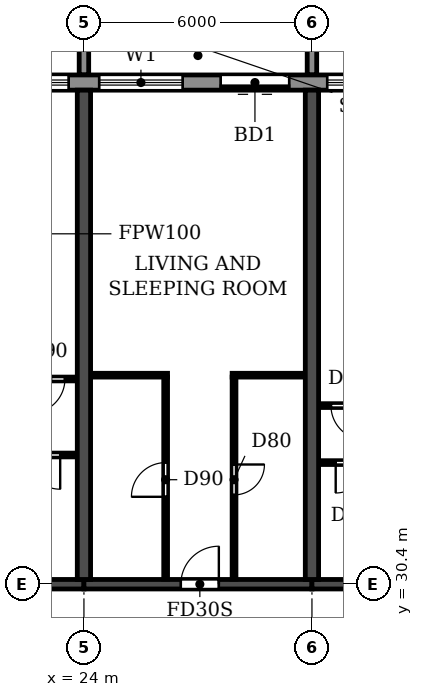
"""IFC4 building model, lengths in metres.
Left out: names, types, materials, properties, quantities, classifications, styles, units other than length and angle.
Written with IfcOpenShell. Run it as: python <this file> out.ifc"""

import sys

from ifc_helpers import new_model, si_unit, direction, frame, frame_2d, origin, place, context, subcontext, project, spatial, polyline, rectangle, outline, extrude, source, transform, mapped, element, fill, save


model = new_model("IFC4")
c1 = context("Model", 3, precision=1e-05, world=origin(), true_north=direction((0.0, 1.0)))
c2 = subcontext(c1, "Body", "Model", "MODEL_VIEW")
j1 = project(units=[si_unit("LENGTHUNIT", "METRE"), si_unit("PLANEANGLEUNIT", "RADIAN")], contexts=[c1])
p1 = place(None, origin())
s1 = spatial("IfcSite", under=j1, at=p1, CompositionType="ELEMENT")
p2 = place(p1, origin())
s2 = spatial("IfcBuilding", under=s1, at=p2, CompositionType="ELEMENT")
p3 = place(p2, frame((0.0, 0.0, 72.9)))
s3 = spatial("IfcBuildingStorey", under=s2, at=p3, CompositionType="ELEMENT", Elevation=72.9)
for number, where, z_axis, x_axis in (
    (1, (24.0, 30.525, 0.0), (0.0, 0.0, 1.0), (0.0, 1.0, 0.0)),
    (2, (30.0, 30.525, 0.0), (0.0, 0.0, 1.0), (0.0, 1.0, 0.0)),
):
    element("IfcWall", number, at=place(p3, frame(where, z_axis=z_axis, x_axis=x_axis)), inside=s3, PredefinedType="SHEAR", context=c2, shape_type="SweptSolid", body=[
        extrude(rectangle(XDim=12.875, YDim=0.35, at=frame_2d((6.438, 0.0))), origin(), (0.0, 0.0, 1.0), 3.06),
    ])
p4 = place(p3, frame((18.0, 30.4, 0.0), z_axis=(0.0, 0.0, 1.0), x_axis=(1.0, 0.0, 0.0)))
e3 = element("IfcWall", 3, at=p4, inside=s3, PredefinedType="SHEAR", context=c2, shape_type="SweptSolid", body=[
    extrude(rectangle(XDim=6.0, YDim=0.25, at=frame_2d((3.0, 0.0))), origin(), (0.0, 0.0, 1.0), 2.46),
])
p5 = place(p4, frame((2.45, 0.0, 0.0)))
e4 = element("IfcOpeningElement", 4, at=p5, cuts=e3, PredefinedType="OPENING", context=c2, shape_type="SweptSolid", body=[
    extrude(rectangle(XDim=1.0, YDim=2.1, at=frame_2d((0.5, 1.05))), frame((0.0, 0.135, 0.0), z_axis=(0.0, -1.0, 0.0), x_axis=(1.0, 0.0, 0.0)), (0.0, 0.0, 1.0), 0.27),
])
p6 = place(p3, frame((24.0, 30.4, 0.0), z_axis=(0.0, 0.0, 1.0), x_axis=(1.0, 0.0, 0.0)))
e5 = element("IfcWall", 5, at=p6, inside=s3, PredefinedType="SHEAR", context=c2, shape_type="SweptSolid", body=[
    extrude(rectangle(XDim=6.0, YDim=0.25, at=frame_2d((3.0, 0.0))), origin(), (0.0, 0.0, 1.0), 2.46),
])
p7 = place(p6, frame((2.55, 0.0, 0.0)))
e6 = element("IfcOpeningElement", 6, at=p7, cuts=e5, PredefinedType="OPENING", context=c2, shape_type="SweptSolid", body=[
    extrude(rectangle(XDim=1.0, YDim=2.1, at=frame_2d((0.5, 1.05))), frame((0.0, 0.135, 0.0), z_axis=(0.0, -1.0, 0.0), x_axis=(1.0, 0.0, 0.0)), (0.0, 0.0, 1.0), 0.27),
])
p8 = place(p3, frame((30.0, 30.4, 0.0), z_axis=(0.0, 0.0, 1.0), x_axis=(1.0, 0.0, 0.0)))
e7 = element("IfcWall", 7, at=p8, inside=s3, PredefinedType="SHEAR", context=c2, shape_type="SweptSolid", body=[
    extrude(rectangle(XDim=6.0, YDim=0.25, at=frame_2d((3.0, 0.0))), origin(), (0.0, 0.0, 1.0), 2.46),
])
p9 = place(p8, frame((2.45, 0.0, 0.0)))
e8 = element("IfcOpeningElement", 8, at=p9, cuts=e7, PredefinedType="OPENING", context=c2, shape_type="SweptSolid", body=[
    extrude(rectangle(XDim=1.0, YDim=2.1, at=frame_2d((0.5, 1.05))), frame((0.0, 0.135, 0.0), z_axis=(0.0, -1.0, 0.0), x_axis=(1.0, 0.0, 0.0)), (0.0, 0.0, 1.0), 0.27),
])
p10 = place(p3, frame((91.317, 43.6, 0.0), z_axis=(0.0, 0.0, 1.0), x_axis=(-1.0, 0.0, 0.0)))
e9 = element("IfcWall", 9, at=p10, inside=s3, PredefinedType="STANDARD", context=c2, shape_type="SweptSolid", body=[
    extrude(rectangle(XDim=80.634, YDim=0.4, at=frame_2d((40.317, 0.0))), origin(), (0.0, 0.0, 1.0), 3.06),
])
p11 = place(p10, frame((76.717, 0.0, 0.9)))
e10 = element("IfcOpeningElement", 10, at=p11, cuts=e9, PredefinedType="OPENING", context=c2, shape_type="SweptSolid", body=[
    extrude(rectangle(XDim=2.2, YDim=1.5, at=frame_2d((1.1, 0.75))), frame((0.0, 0.21, 0.0), z_axis=(0.0, -1.0, 0.0), x_axis=(1.0, 0.0, 0.0)), (0.0, 0.0, 1.0), 0.42),
])
p12 = place(p10, frame((73.917, 0.0, 0.0)))
e11 = element("IfcOpeningElement", 11, at=p12, cuts=e9, PredefinedType="OPENING", context=c2, shape_type="SweptSolid", body=[
    extrude(rectangle(XDim=1.8, YDim=2.4, at=frame_2d((0.9, 1.2))), frame((0.0, 0.21, 0.0), z_axis=(0.0, -1.0, 0.0), x_axis=(1.0, 0.0, 0.0)), (0.0, 0.0, 1.0), 0.42),
])
p13 = place(p10, frame((70.917, 0.0, 0.0)))
e12 = element("IfcOpeningElement", 12, at=p13, cuts=e9, PredefinedType="OPENING", context=c2, shape_type="SweptSolid", body=[
    extrude(rectangle(XDim=1.8, YDim=2.4, at=frame_2d((0.9, 1.2))), frame((0.0, 0.21, 0.0), z_axis=(0.0, -1.0, 0.0), x_axis=(1.0, 0.0, 0.0)), (0.0, 0.0, 1.0), 0.42),
])
p14 = place(p10, frame((67.717, 0.0, 0.9)))
e13 = element("IfcOpeningElement", 13, at=p14, cuts=e9, PredefinedType="OPENING", context=c2, shape_type="SweptSolid", body=[
    extrude(rectangle(XDim=2.2, YDim=1.5, at=frame_2d((1.1, 0.75))), frame((0.0, 0.21, 0.0), z_axis=(0.0, -1.0, 0.0), x_axis=(1.0, 0.0, 0.0)), (0.0, 0.0, 1.0), 0.42),
])
p15 = place(p10, frame((64.717, 0.0, 0.9)))
e14 = element("IfcOpeningElement", 14, at=p15, cuts=e9, PredefinedType="OPENING", context=c2, shape_type="SweptSolid", body=[
    extrude(rectangle(XDim=2.2, YDim=1.5, at=frame_2d((1.1, 0.75))), frame((0.0, 0.21, 0.0), z_axis=(0.0, -1.0, 0.0), x_axis=(1.0, 0.0, 0.0)), (0.0, 0.0, 1.0), 0.42),
])
p16 = place(p10, frame((61.917, 0.0, 0.0)))
e15 = element("IfcOpeningElement", 15, at=p16, cuts=e9, PredefinedType="OPENING", context=c2, shape_type="SweptSolid", body=[
    extrude(rectangle(XDim=1.8, YDim=2.4, at=frame_2d((0.9, 1.2))), frame((0.0, 0.21, 0.0), z_axis=(0.0, -1.0, 0.0), x_axis=(1.0, 0.0, 0.0)), (0.0, 0.0, 1.0), 0.42),
])
p17 = place(p10, frame((58.717, 0.0, 0.9)))
e16 = element("IfcOpeningElement", 16, at=p17, cuts=e9, PredefinedType="OPENING", context=c2, shape_type="SweptSolid", body=[
    extrude(rectangle(XDim=2.2, YDim=1.5, at=frame_2d((1.1, 0.75))), frame((0.0, 0.21, 0.0), z_axis=(0.0, -1.0, 0.0), x_axis=(1.0, 0.0, 0.0)), (0.0, 0.0, 1.0), 0.42),
])
p18 = place(p10, frame((55.917, 0.0, 0.0)))
e17 = element("IfcOpeningElement", 17, at=p18, cuts=e9, PredefinedType="OPENING", context=c2, shape_type="SweptSolid", body=[
    extrude(rectangle(XDim=1.8, YDim=2.4, at=frame_2d((0.9, 1.2))), frame((0.0, 0.21, 0.0), z_axis=(0.0, -1.0, 0.0), x_axis=(1.0, 0.0, 0.0)), (0.0, 0.0, 1.0), 0.42),
])
p19 = place(p10, frame((52.717, 0.0, 0.9)))
e18 = element("IfcOpeningElement", 18, at=p19, cuts=e9, PredefinedType="OPENING", context=c2, shape_type="SweptSolid", body=[
    extrude(rectangle(XDim=2.2, YDim=1.5, at=frame_2d((1.1, 0.75))), frame((0.0, 0.21, 0.0), z_axis=(0.0, -1.0, 0.0), x_axis=(1.0, 0.0, 0.0)), (0.0, 0.0, 1.0), 0.42),
])
p20 = place(p10, frame((49.717, 0.0, 0.9)))
e19 = element("IfcOpeningElement", 19, at=p20, cuts=e9, PredefinedType="OPENING", context=c2, shape_type="SweptSolid", body=[
    extrude(rectangle(XDim=2.2, YDim=1.5, at=frame_2d((1.1, 0.75))), frame((0.0, 0.21, 0.0), z_axis=(0.0, -1.0, 0.0), x_axis=(1.0, 0.0, 0.0)), (0.0, 0.0, 1.0), 0.42),
])
p21 = place(p10, frame((46.917, 0.0, 0.0)))
e20 = element("IfcOpeningElement", 20, at=p21, cuts=e9, PredefinedType="OPENING", context=c2, shape_type="SweptSolid", body=[
    extrude(rectangle(XDim=1.8, YDim=2.4, at=frame_2d((0.9, 1.2))), frame((0.0, 0.21, 0.0), z_axis=(0.0, -1.0, 0.0), x_axis=(1.0, 0.0, 0.0)), (0.0, 0.0, 1.0), 0.42),
])
p22 = place(p10, frame((43.717, 0.0, 0.9)))
e21 = element("IfcOpeningElement", 21, at=p22, cuts=e9, PredefinedType="OPENING", context=c2, shape_type="SweptSolid", body=[
    extrude(rectangle(XDim=2.2, YDim=1.5, at=frame_2d((1.1, 0.75))), frame((0.0, 0.21, 0.0), z_axis=(0.0, -1.0, 0.0), x_axis=(1.0, 0.0, 0.0)), (0.0, 0.0, 1.0), 0.42),
])
p23 = place(p10, frame((40.717, 0.0, 0.9)))
e22 = element("IfcOpeningElement", 22, at=p23, cuts=e9, PredefinedType="OPENING", context=c2, shape_type="SweptSolid", body=[
    extrude(rectangle(XDim=2.2, YDim=1.5, at=frame_2d((1.1, 0.75))), frame((0.0, 0.21, 0.0), z_axis=(0.0, -1.0, 0.0), x_axis=(1.0, 0.0, 0.0)), (0.0, 0.0, 1.0), 0.42),
])
p24 = place(p10, frame((37.917, 0.0, 0.0)))
e23 = element("IfcOpeningElement", 23, at=p24, cuts=e9, PredefinedType="OPENING", context=c2, shape_type="SweptSolid", body=[
    extrude(rectangle(XDim=1.8, YDim=2.4, at=frame_2d((0.9, 1.2))), frame((0.0, 0.21, 0.0), z_axis=(0.0, -1.0, 0.0), x_axis=(1.0, 0.0, 0.0)), (0.0, 0.0, 1.0), 0.42),
])
p25 = place(p10, frame((34.717, 0.0, 0.9)))
e24 = element("IfcOpeningElement", 24, at=p25, cuts=e9, PredefinedType="OPENING", context=c2, shape_type="SweptSolid", body=[
    extrude(rectangle(XDim=2.2, YDim=1.5, at=frame_2d((1.1, 0.75))), frame((0.0, 0.21, 0.0), z_axis=(0.0, -1.0, 0.0), x_axis=(1.0, 0.0, 0.0)), (0.0, 0.0, 1.0), 0.42),
])
p26 = place(p10, frame((31.917, 0.0, 0.0)))
e25 = element("IfcOpeningElement", 25, at=p26, cuts=e9, PredefinedType="OPENING", context=c2, shape_type="SweptSolid", body=[
    extrude(rectangle(XDim=1.8, YDim=2.4, at=frame_2d((0.9, 1.2))), frame((0.0, 0.21, 0.0), z_axis=(0.0, -1.0, 0.0), x_axis=(1.0, 0.0, 0.0)), (0.0, 0.0, 1.0), 0.42),
])
p27 = place(p10, frame((28.717, 0.0, 0.9)))
e26 = element("IfcOpeningElement", 26, at=p27, cuts=e9, PredefinedType="OPENING", context=c2, shape_type="SweptSolid", body=[
    extrude(rectangle(XDim=2.2, YDim=1.5, at=frame_2d((1.1, 0.75))), frame((0.0, 0.21, 0.0), z_axis=(0.0, -1.0, 0.0), x_axis=(1.0, 0.0, 0.0)), (0.0, 0.0, 1.0), 0.42),
])
p28 = place(p10, frame((25.717, 0.0, 0.9)))
e27 = element("IfcOpeningElement", 27, at=p28, cuts=e9, PredefinedType="OPENING", context=c2, shape_type="SweptSolid", body=[
    extrude(rectangle(XDim=2.2, YDim=1.5, at=frame_2d((1.1, 0.75))), frame((0.0, 0.21, 0.0), z_axis=(0.0, -1.0, 0.0), x_axis=(1.0, 0.0, 0.0)), (0.0, 0.0, 1.0), 0.42),
])
p29 = place(p10, frame((22.717, 0.0, 0.9)))
e28 = element("IfcOpeningElement", 28, at=p29, cuts=e9, PredefinedType="OPENING", context=c2, shape_type="SweptSolid", body=[
    extrude(rectangle(XDim=2.2, YDim=1.5, at=frame_2d((1.1, 0.75))), frame((0.0, 0.21, 0.0), z_axis=(0.0, -1.0, 0.0), x_axis=(1.0, 0.0, 0.0)), (0.0, 0.0, 1.0), 0.42),
])
p30 = place(p10, frame((19.917, 0.0, 0.0)))
e29 = element("IfcOpeningElement", 29, at=p30, cuts=e9, PredefinedType="OPENING", context=c2, shape_type="SweptSolid", body=[
    extrude(rectangle(XDim=1.8, YDim=2.4, at=frame_2d((0.9, 1.2))), frame((0.0, 0.21, 0.0), z_axis=(0.0, -1.0, 0.0), x_axis=(1.0, 0.0, 0.0)), (0.0, 0.0, 1.0), 0.42),
])
p31 = place(p10, frame((16.717, 0.0, 0.9)))
e30 = element("IfcOpeningElement", 30, at=p31, cuts=e9, PredefinedType="OPENING", context=c2, shape_type="SweptSolid", body=[
    extrude(rectangle(XDim=2.2, YDim=1.5, at=frame_2d((1.1, 0.75))), frame((0.0, 0.21, 0.0), z_axis=(0.0, -1.0, 0.0), x_axis=(1.0, 0.0, 0.0)), (0.0, 0.0, 1.0), 0.42),
])
p32 = place(p10, frame((13.717, 0.0, 0.9)))
e31 = element("IfcOpeningElement", 31, at=p32, cuts=e9, PredefinedType="OPENING", context=c2, shape_type="SweptSolid", body=[
    extrude(rectangle(XDim=2.2, YDim=1.5, at=frame_2d((1.1, 0.75))), frame((0.0, 0.21, 0.0), z_axis=(0.0, -1.0, 0.0), x_axis=(1.0, 0.0, 0.0)), (0.0, 0.0, 1.0), 0.42),
])
p33 = place(p10, frame((10.717, 0.0, 0.9)))
e32 = element("IfcOpeningElement", 32, at=p33, cuts=e9, PredefinedType="OPENING", context=c2, shape_type="SweptSolid", body=[
    extrude(rectangle(XDim=2.2, YDim=1.5, at=frame_2d((1.1, 0.75))), frame((0.0, 0.21, 0.0), z_axis=(0.0, -1.0, 0.0), x_axis=(1.0, 0.0, 0.0)), (0.0, 0.0, 1.0), 0.42),
])
p34 = place(p10, frame((7.917, 0.0, 0.0)))
e33 = element("IfcOpeningElement", 33, at=p34, cuts=e9, PredefinedType="OPENING", context=c2, shape_type="SweptSolid", body=[
    extrude(rectangle(XDim=1.8, YDim=2.4, at=frame_2d((0.9, 1.2))), frame((0.0, 0.21, 0.0), z_axis=(0.0, -1.0, 0.0), x_axis=(1.0, 0.0, 0.0)), (0.0, 0.0, 1.0), 0.42),
])
p35 = place(p10, frame((4.717, 0.0, 0.9)))
e34 = element("IfcOpeningElement", 34, at=p35, cuts=e9, PredefinedType="OPENING", context=c2, shape_type="SweptSolid", body=[
    extrude(rectangle(XDim=2.2, YDim=1.5, at=frame_2d((1.1, 0.75))), frame((0.0, 0.21, 0.0), z_axis=(0.0, -1.0, 0.0), x_axis=(1.0, 0.0, 0.0)), (0.0, 0.0, 1.0), 0.42),
])
p36 = place(p10, frame((1.917, 0.0, 0.0)))
e35 = element("IfcOpeningElement", 35, at=p36, cuts=e9, PredefinedType="OPENING", context=c2, shape_type="SweptSolid", body=[
    extrude(rectangle(XDim=1.8, YDim=2.4, at=frame_2d((0.9, 1.2))), frame((0.0, 0.21, 0.0), z_axis=(0.0, -1.0, 0.0), x_axis=(1.0, 0.0, 0.0)), (0.0, 0.0, 1.0), 0.42),
])
m1 = source(origin(), c2, "Body", "SweptSolid", [
    extrude(outline(polyline([(0.0, 0.0), (0.25, 0.0), (0.25, 3.1), (0.0, 3.1), (0.0, 0.0)])), origin(), (0.0, 0.0, 1.0), 3.1),
])
for number, where in (
    (36, (23.875, 43.8, 0.0)),
    (37, (29.875, 43.8, 0.0)),
):
    element("IfcWall", number, at=place(p3, frame(where)), inside=s3, PredefinedType="STANDARD", context=c2, shape_type="MappedRepresentation", body=[
        mapped(m1, transform((0.0, 0.0, 0.0))),
    ])
p37 = place(p3, frame((30.185, 33.6, 0.0), z_axis=(0.0, 0.0, 1.0), x_axis=(1.0, 0.0, 0.0)))
e38 = element("IfcWall", 38, at=p37, inside=s3, PredefinedType="PARTITIONING", context=c2, shape_type="SweptSolid", body=[
    extrude(rectangle(XDim=1.915, YDim=0.1, at=frame_2d((0.958, 0.0))), origin(), (0.0, 0.0, 1.0), 3.06),
])
p38 = place(p37, frame((0.44, 0.0, 0.0)))
e39 = element("IfcOpeningElement", 39, at=p38, cuts=e38, PredefinedType="OPENING", context=c2, shape_type="SweptSolid", body=[
    extrude(rectangle(XDim=0.8, YDim=2.1, at=frame_2d((0.4, 1.05))), frame((0.0, 0.06, 0.0), z_axis=(0.0, -1.0, 0.0), x_axis=(1.0, 0.0, 0.0)), (0.0, 0.0, 1.0), 0.12),
])
p39 = place(p3, frame((21.8, 33.8, 0.0), z_axis=(0.0, 0.0, 1.0), x_axis=(1.0, 0.0, 0.0)))
e40 = element("IfcWall", 40, at=p39, inside=s3, PredefinedType="PARTITIONING", context=c2, shape_type="SweptSolid", body=[
    extrude(rectangle(XDim=2.015, YDim=0.1, at=frame_2d((1.007, 0.0))), origin(), (0.0, 0.0, 1.0), 3.06),
])
p40 = place(p39, frame((0.675, 0.0, 0.0)))
e41 = element("IfcOpeningElement", 41, at=p40, cuts=e40, PredefinedType="OPENING", context=c2, shape_type="SweptSolid", body=[
    extrude(rectangle(XDim=0.9, YDim=2.1, at=frame_2d((0.45, 1.05))), frame((0.0, 0.06, 0.0), z_axis=(0.0, -1.0, 0.0), x_axis=(1.0, 0.0, 0.0)), (0.0, 0.0, 1.0), 0.12),
])
p41 = place(p3, frame((30.185, 35.1, 0.0), z_axis=(0.0, 0.0, 1.0), x_axis=(1.0, 0.0, 0.0)))
e42 = element("IfcWall", 42, at=p41, inside=s3, PredefinedType="PARTITIONING", context=c2, shape_type="SweptSolid", body=[
    extrude(rectangle(XDim=2.865, YDim=0.1, at=frame_2d((1.433, 0.0))), origin(), (0.0, 0.0, 1.0), 3.06),
])
p42 = place(p41, frame((0.315, 0.0, 0.0)))
e43 = element("IfcOpeningElement", 43, at=p42, cuts=e42, PredefinedType="OPENING", context=c2, shape_type="SweptSolid", body=[
    extrude(rectangle(XDim=0.9, YDim=2.1, at=frame_2d((0.45, 1.05))), frame((0.0, 0.06, 0.0), z_axis=(0.0, -1.0, 0.0), x_axis=(1.0, 0.0, 0.0)), (0.0, 0.0, 1.0), 0.12),
])
p43 = place(p3, frame((20.95, 35.8, 0.0), z_axis=(0.0, 0.0, 1.0), x_axis=(1.0, 0.0, 0.0)))
e44 = element("IfcWall", 44, at=p43, inside=s3, PredefinedType="PARTITIONING", context=c2, shape_type="SweptSolid", body=[
    extrude(rectangle(XDim=2.865, YDim=0.1, at=frame_2d((1.433, 0.0))), origin(), (0.0, 0.0, 1.0), 3.06),
])
p44 = place(p43, frame((1.65, 0.0, 0.0)))
e45 = element("IfcOpeningElement", 45, at=p44, cuts=e44, PredefinedType="OPENING", context=c2, shape_type="SweptSolid", body=[
    extrude(rectangle(XDim=0.9, YDim=2.1, at=frame_2d((0.45, 1.05))), frame((0.0, 0.06, 0.0), z_axis=(0.0, -1.0, 0.0), x_axis=(1.0, 0.0, 0.0)), (0.0, 0.0, 1.0), 0.12),
])
p45 = place(p3, frame((24.185, 35.9, 0.0), z_axis=(0.0, 0.0, 1.0), x_axis=(1.0, 0.0, 0.0)))
e46 = element("IfcWall", 46, at=p45, inside=s3, PredefinedType="PARTITIONING", context=c2, shape_type="SweptSolid", body=[
    extrude(rectangle(XDim=2.015, YDim=0.1, at=frame_2d((1.007, 0.0))), origin(), (0.0, 0.0, 1.0), 3.06),
])
p46 = place(p3, frame((27.9, 35.9, 0.0), z_axis=(0.0, 0.0, 1.0), x_axis=(1.0, 0.0, 0.0)))
e47 = element("IfcWall", 47, at=p46, inside=s3, PredefinedType="PARTITIONING", context=c2, shape_type="SweptSolid", body=[
    extrude(rectangle(XDim=1.915, YDim=0.1, at=frame_2d((0.958, 0.0))), origin(), (0.0, 0.0, 1.0), 3.06),
])
p47 = place(p3, frame((26.15, 30.535, 0.0), z_axis=(0.0, 0.0, 1.0), x_axis=(0.0, 1.0, 0.0)))
e48 = element("IfcWall", 48, at=p47, inside=s3, PredefinedType="PARTITIONING", context=c2, shape_type="SweptSolid", body=[
    extrude(rectangle(XDim=5.315, YDim=0.1, at=frame_2d((2.658, 0.0))), origin(), (0.0, 0.0, 1.0), 3.06),
])
p48 = place(p47, frame((2.165, 0.0, 0.0)))
e49 = element("IfcOpeningElement", 49, at=p48, cuts=e48, PredefinedType="OPENING", context=c2, shape_type="SweptSolid", body=[
    extrude(rectangle(XDim=0.9, YDim=2.1, at=frame_2d((0.45, 1.05))), frame((0.0, 0.06, 0.0), z_axis=(0.0, -1.0, 0.0), x_axis=(1.0, 0.0, 0.0)), (0.0, 0.0, 1.0), 0.12),
])
p49 = place(p3, frame((27.95, 30.535, 0.0), z_axis=(0.0, 0.0, 1.0), x_axis=(0.0, 1.0, 0.0)))
e50 = element("IfcWall", 50, at=p49, inside=s3, PredefinedType="PARTITIONING", context=c2, shape_type="SweptSolid", body=[
    extrude(rectangle(XDim=5.315, YDim=0.1, at=frame_2d((2.658, 0.0))), origin(), (0.0, 0.0, 1.0), 3.06),
])
p50 = place(p49, frame((2.215, 0.0, 0.0)))
e51 = element("IfcOpeningElement", 51, at=p50, cuts=e50, PredefinedType="OPENING", context=c2, shape_type="SweptSolid", body=[
    extrude(rectangle(XDim=0.8, YDim=2.1, at=frame_2d((0.4, 1.05))), frame((0.0, 0.06, 0.0), z_axis=(0.0, -1.0, 0.0), x_axis=(1.0, 0.0, 0.0)), (0.0, 0.0, 1.0), 0.12),
])
p51 = place(p14, origin())
e52 = element("IfcWindow", 52, at=p51, inside=s3, PartitioningType="DOUBLE_PANEL_HORIZONTAL", PredefinedType="WINDOW", context=c2, shape_type="SweptSolid", body=[
    extrude(rectangle(XDim=2.2, YDim=1.5, at=frame_2d((1.1, 0.75))), frame((0.0, 0.03, 0.0), z_axis=(0.0, -1.0, 0.0), x_axis=(1.0, 0.0, 0.0)), (0.0, 0.0, 1.0), 0.06),
])
fill(e13, e52)
p52 = place(p15, origin())
e53 = element("IfcWindow", 53, at=p52, inside=s3, PartitioningType="DOUBLE_PANEL_HORIZONTAL", PredefinedType="WINDOW", context=c2, shape_type="SweptSolid", body=[
    extrude(rectangle(XDim=2.2, YDim=1.5, at=frame_2d((1.1, 0.75))), frame((0.0, 0.03, 0.0), z_axis=(0.0, -1.0, 0.0), x_axis=(1.0, 0.0, 0.0)), (0.0, 0.0, 1.0), 0.06),
])
fill(e14, e53)
p53 = place(p16, origin())
e54 = element("IfcDoor", 54, at=p53, inside=s3, OperationType="DOUBLE_DOOR_SLIDING", PredefinedType="DOOR", context=c2, shape_type="SweptSolid", body=[
    extrude(rectangle(XDim=1.8, YDim=2.4, at=frame_2d((0.9, 1.2))), frame((0.0, 0.025, 0.0), z_axis=(0.0, -1.0, 0.0), x_axis=(1.0, 0.0, 0.0)), (0.0, 0.0, 1.0), 0.05),
])
fill(e15, e54)
p54 = place(p17, origin())
e55 = element("IfcWindow", 55, at=p54, inside=s3, PartitioningType="DOUBLE_PANEL_HORIZONTAL", PredefinedType="WINDOW", context=c2, shape_type="SweptSolid", body=[
    extrude(rectangle(XDim=2.2, YDim=1.5, at=frame_2d((1.1, 0.75))), frame((0.0, 0.03, 0.0), z_axis=(0.0, -1.0, 0.0), x_axis=(1.0, 0.0, 0.0)), (0.0, 0.0, 1.0), 0.06),
])
fill(e16, e55)
p55 = place(p40, frame((0.9, 0.0, 0.0), z_axis=(0.0, 0.0, 1.0), x_axis=(-1.0, 0.0, 0.0)))
e56 = element("IfcDoor", 56, at=p55, inside=s3, OperationType="SINGLE_SWING_LEFT", PredefinedType="DOOR", context=c2, shape_type="SweptSolid", body=[
    extrude(rectangle(XDim=0.9, YDim=2.1, at=frame_2d((0.45, 1.05))), frame((0.0, 0.025, 0.0), z_axis=(0.0, -1.0, 0.0), x_axis=(1.0, 0.0, 0.0)), (0.0, 0.0, 1.0), 0.05),
])
fill(e41, e56)
p56 = place(p44, frame((0.9, 0.0, 0.0), z_axis=(0.0, 0.0, 1.0), x_axis=(-1.0, 0.0, 0.0)))
e57 = element("IfcDoor", 57, at=p56, inside=s3, OperationType="SINGLE_SWING_RIGHT", PredefinedType="DOOR", context=c2, shape_type="SweptSolid", body=[
    extrude(rectangle(XDim=0.9, YDim=2.1, at=frame_2d((0.45, 1.05))), frame((0.0, 0.025, 0.0), z_axis=(0.0, -1.0, 0.0), x_axis=(1.0, 0.0, 0.0)), (0.0, 0.0, 1.0), 0.05),
])
fill(e45, e57)
p57 = place(p48, origin())
e58 = element("IfcDoor", 58, at=p57, inside=s3, OperationType="SINGLE_SWING_LEFT", PredefinedType="DOOR", context=c2, shape_type="SweptSolid", body=[
    extrude(rectangle(XDim=0.9, YDim=2.1, at=frame_2d((0.45, 1.05))), frame((0.0, 0.025, 0.0), z_axis=(0.0, -1.0, 0.0), x_axis=(1.0, 0.0, 0.0)), (0.0, 0.0, 1.0), 0.05),
])
fill(e49, e58)
p58 = place(p7, origin())
e59 = element("IfcDoor", 59, at=p58, inside=s3, OperationType="SINGLE_SWING_RIGHT", PredefinedType="DOOR", context=c2, shape_type="SweptSolid", body=[
    extrude(rectangle(XDim=1.0, YDim=2.1, at=frame_2d((0.5, 1.05))), frame((0.0, 0.025, 0.0), z_axis=(0.0, -1.0, 0.0), x_axis=(1.0, 0.0, 0.0)), (0.0, 0.0, 1.0), 0.05),
])
fill(e6, e59)
p59 = place(p50, frame((0.8, 0.0, 0.0), z_axis=(0.0, 0.0, 1.0), x_axis=(-1.0, 0.0, 0.0)))
e60 = element("IfcDoor", 60, at=p59, inside=s3, OperationType="SINGLE_SWING_LEFT", PredefinedType="DOOR", context=c2, shape_type="SweptSolid", body=[
    extrude(rectangle(XDim=0.8, YDim=2.1, at=frame_2d((0.4, 1.05))), frame((0.0, 0.025, 0.0), z_axis=(0.0, -1.0, 0.0), x_axis=(1.0, 0.0, 0.0)), (0.0, 0.0, 1.0), 0.05),
])
fill(e51, e60)
p60 = place(p42, frame((0.9, 0.0, 0.0), z_axis=(0.0, 0.0, 1.0), x_axis=(-1.0, 0.0, 0.0)))
e61 = element("IfcDoor", 61, at=p60, inside=s3, OperationType="SINGLE_SWING_LEFT", PredefinedType="DOOR", context=c2, shape_type="SweptSolid", body=[
    extrude(rectangle(XDim=0.9, YDim=2.1, at=frame_2d((0.45, 1.05))), frame((0.0, 0.025, 0.0), z_axis=(0.0, -1.0, 0.0), x_axis=(1.0, 0.0, 0.0)), (0.0, 0.0, 1.0), 0.05),
])
fill(e43, e61)
p61 = place(p38, frame((0.8, 0.0, 0.0), z_axis=(0.0, 0.0, 1.0), x_axis=(-1.0, 0.0, 0.0)))
e62 = element("IfcDoor", 62, at=p61, inside=s3, OperationType="SINGLE_SWING_RIGHT", PredefinedType="DOOR", context=c2, shape_type="SweptSolid", body=[
    extrude(rectangle(XDim=0.8, YDim=2.1, at=frame_2d((0.4, 1.05))), frame((0.0, 0.025, 0.0), z_axis=(0.0, -1.0, 0.0), x_axis=(1.0, 0.0, 0.0)), (0.0, 0.0, 1.0), 0.05),
])
fill(e39, e62)
save(model, sys.argv[1])
